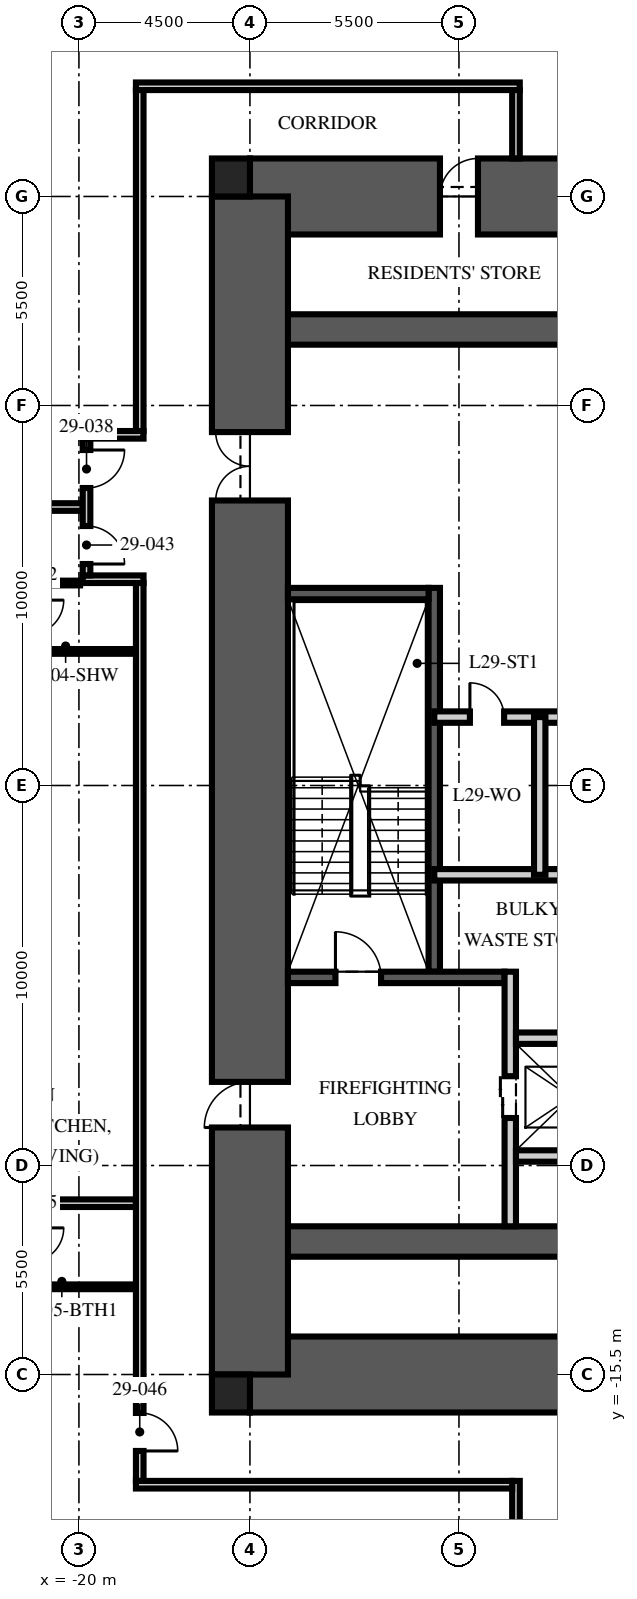
"""IFC4 building model, lengths in metres.
Left out: names, types, materials, properties, quantities, classifications, styles, units other than length and angle.
Written with IfcOpenShell. Run it as: python <this file> out.ifc"""

import sys

from ifc_helpers import new_model, si_unit, direction, frame, frame_2d, origin, origin_2d, place, context, subcontext, project, spatial, rectangle, extrude, element, fill, save


model = new_model("IFC4")
c1 = context("Model", 3, precision=1e-05, world=origin(), true_north=direction((0.0, 1.0)))
c2 = subcontext(c1, "Body", "Model", "MODEL_VIEW")
j1 = project(units=[si_unit("LENGTHUNIT", "METRE"), si_unit("PLANEANGLEUNIT", "RADIAN")], contexts=[c1])
p1 = place(None, origin())
s1 = spatial("IfcSite", under=j1, at=p1, CompositionType="ELEMENT")
p2 = place(p1, origin())
s2 = spatial("IfcBuilding", under=s1, at=p2, CompositionType="ELEMENT")
p3 = place(p2, frame((0.0, 0.0, 118.5)))
s3 = spatial("IfcBuildingStorey", under=s2, at=p3, CompositionType="ELEMENT", Elevation=118.5)
p4 = place(p3, frame((-15.5, 15.5, -0.25), z_axis=(0.0, 0.0, 1.0), x_axis=(1.0, 0.0, 0.0)))
e1 = element("IfcWall", 1, at=p4, inside=s3, PredefinedType="SHEAR", context=c2, shape_type="SweptSolid", body=[
    extrude(rectangle(XDim=31.0, YDim=2.0, at=frame_2d((15.5, 0.0))), origin(), (0.0, 0.0, 1.0), 3.75),
])
p5 = place(p4, frame((5.0, 0.0, 0.25)))
e2 = element("IfcOpeningElement", 2, at=p5, cuts=e1, PredefinedType="OPENING", context=c2, shape_type="SweptSolid", body=[
    extrude(rectangle(XDim=1.0, YDim=2.1, at=frame_2d((0.5, 1.05))), frame((0.0, 1.01, 0.0), z_axis=(0.0, -1.0, 0.0), x_axis=(1.0, 0.0, 0.0)), (0.0, 0.0, 1.0), 2.02),
])
p6 = place(p3, frame((-15.5, -15.5, -0.25), z_axis=(0.0, 0.0, 1.0), x_axis=(1.0, 0.0, 0.0)))
e3 = element("IfcWall", 3, at=p6, inside=s3, PredefinedType="SHEAR", context=c2, shape_type="SweptSolid", body=[
    extrude(rectangle(XDim=31.0, YDim=2.0, at=frame_2d((15.5, 0.0))), origin(), (0.0, 0.0, 1.0), 3.75),
])
p7 = place(p6, frame((10.4, 0.0, 0.25)))
e4 = element("IfcOpeningElement", 4, at=p7, cuts=e3, PredefinedType="OPENING", context=c2, shape_type="SweptSolid", body=[
    extrude(rectangle(XDim=1.1, YDim=2.1, at=frame_2d((0.55, 1.05))), frame((0.0, 1.01, 0.0), z_axis=(0.0, -1.0, 0.0), x_axis=(1.0, 0.0, 0.0)), (0.0, 0.0, 1.0), 2.02),
])
p8 = place(p6, frame((13.5, 0.0, 0.25)))
e5 = element("IfcOpeningElement", 5, at=p8, cuts=e3, PredefinedType="OPENING", context=c2, shape_type="SweptSolid", body=[
    extrude(rectangle(XDim=1.1, YDim=2.1, at=frame_2d((0.55, 1.05))), frame((0.0, 1.01, 0.0), z_axis=(0.0, -1.0, 0.0), x_axis=(1.0, 0.0, 0.0)), (0.0, 0.0, 1.0), 2.02),
])
p9 = place(p6, frame((16.6, 0.0, 0.25)))
e6 = element("IfcOpeningElement", 6, at=p9, cuts=e3, PredefinedType="OPENING", context=c2, shape_type="SweptSolid", body=[
    extrude(rectangle(XDim=1.1, YDim=2.1, at=frame_2d((0.55, 1.05))), frame((0.0, 1.01, 0.0), z_axis=(0.0, -1.0, 0.0), x_axis=(1.0, 0.0, 0.0)), (0.0, 0.0, 1.0), 2.02),
])
for number, where, z_axis, x_axis in (
    (7, (-15.5, 12.0, -0.25), (0.0, 0.0, 1.0), (1.0, 0.0, 0.0)),
    (8, (-15.5, -12.0, -0.25), (0.0, 0.0, 1.0), (1.0, 0.0, 0.0)),
):
    element("IfcWall", number, at=place(p3, frame(where, z_axis=z_axis, x_axis=x_axis)), inside=s3, PredefinedType="SHEAR", context=c2, shape_type="SweptSolid", body=[
        extrude(rectangle(XDim=31.0, YDim=0.8, at=frame_2d((15.5, 0.0))), origin(), (0.0, 0.0, 1.0), 3.75),
    ])
p10 = place(p3, frame((-15.5, -15.5, -0.25), z_axis=(0.0, 0.0, 1.0), x_axis=(0.0, 1.0, 0.0)))
e9 = element("IfcWall", 9, at=p10, inside=s3, PredefinedType="SHEAR", context=c2, shape_type="SweptSolid", body=[
    extrude(rectangle(XDim=31.0, YDim=2.0, at=frame_2d((15.5, 0.0))), origin(), (0.0, 0.0, 1.0), 3.75),
])
p11 = place(p10, frame((6.5, 0.0, 0.25)))
e10 = element("IfcOpeningElement", 10, at=p11, cuts=e9, PredefinedType="OPENING", context=c2, shape_type="SweptSolid", body=[
    extrude(rectangle(XDim=1.2, YDim=2.1, at=frame_2d((0.6, 1.05))), frame((0.0, 1.01, 0.0), z_axis=(0.0, -1.0, 0.0), x_axis=(1.0, 0.0, 0.0)), (0.0, 0.0, 1.0), 2.02),
])
p12 = place(p10, frame((23.0, 0.0, 0.25)))
e11 = element("IfcOpeningElement", 11, at=p12, cuts=e9, PredefinedType="OPENING", context=c2, shape_type="SweptSolid", body=[
    extrude(rectangle(XDim=1.8, YDim=2.1, at=frame_2d((0.9, 1.05))), frame((0.0, 1.01, 0.0), z_axis=(0.0, -1.0, 0.0), x_axis=(1.0, 0.0, 0.0)), (0.0, 0.0, 1.0), 2.02),
])
for number, where, z_axis, x_axis in (
    (12, (-16.0, 16.0, -0.25), (0.0, 0.0, 1.0), (1.0, 0.0, 0.0)),
    (13, (-16.0, -16.0, -0.25), (0.0, 0.0, 1.0), (1.0, 0.0, 0.0)),
):
    element("IfcColumn", number, at=place(p3, frame(where, z_axis=z_axis, x_axis=x_axis)), inside=s3, PredefinedType="COLUMN", context=c2, shape_type="SweptSolid", body=[
        extrude(rectangle(XDim=1.0, YDim=1.0, at=origin_2d()), origin(), (0.0, 0.0, 1.0), 3.75),
    ])
p13 = place(p3, frame((-10.65, -4.9, 0.0), z_axis=(0.0, 0.0, 1.0), x_axis=(0.0, 1.0, 0.0)))
e14 = element("IfcWall", 14, at=p13, inside=s3, PredefinedType="SOLIDWALL", context=c2, shape_type="SweptSolid", body=[
    extrude(rectangle(XDim=10.1, YDim=0.3, at=frame_2d((5.05, 0.0))), origin(), (0.0, 0.0, 1.0), 3.5),
])
p14 = place(p3, frame((-14.5, -5.05, 0.0), z_axis=(0.0, 0.0, 1.0), x_axis=(1.0, 0.0, 0.0)))
e15 = element("IfcWall", 15, at=p14, inside=s3, PredefinedType="SOLIDWALL", context=c2, shape_type="SweptSolid", body=[
    extrude(rectangle(XDim=5.7, YDim=0.3, at=frame_2d((2.85, 0.0))), origin(), (0.0, 0.0, 1.0), 3.5),
])
p15 = place(p14, frame((1.25, 0.0, 0.0)))
e16 = element("IfcOpeningElement", 16, at=p15, cuts=e15, PredefinedType="OPENING", context=c2, shape_type="SweptSolid", body=[
    extrude(rectangle(XDim=1.2, YDim=2.1, at=frame_2d((0.6, 1.05))), frame((0.0, 0.16, 0.0), z_axis=(0.0, -1.0, 0.0), x_axis=(1.0, 0.0, 0.0)), (0.0, 0.0, 1.0), 0.32),
])
p16 = place(p3, frame((-14.5, 5.05, 0.0), z_axis=(0.0, 0.0, 1.0), x_axis=(1.0, 0.0, 0.0)))
e17 = element("IfcWall", 17, at=p16, inside=s3, PredefinedType="SOLIDWALL", context=c2, shape_type="SweptSolid", body=[
    extrude(rectangle(XDim=3.7, YDim=0.3, at=frame_2d((1.85, 0.0))), origin(), (0.0, 0.0, 1.0), 3.5),
])
p17 = place(p3, frame((-8.65, -11.6, 0.0), z_axis=(0.0, 0.0, 1.0), x_axis=(0.0, 1.0, 0.0)))
e18 = element("IfcWall", 18, at=p17, inside=s3, PredefinedType="PARTITIONING", context=c2, shape_type="SweptSolid", body=[
    extrude(rectangle(XDim=6.7, YDim=0.3, at=frame_2d((3.35, 0.0))), origin(), (0.0, 0.0, 1.0), 3.5),
])
p18 = place(p17, frame((2.85, 0.0, 0.0)))
e19 = element("IfcOpeningElement", 19, at=p18, cuts=e18, PredefinedType="OPENING", context=c2, shape_type="SweptSolid", body=[
    extrude(rectangle(XDim=1.1, YDim=2.1, at=frame_2d((0.55, 1.05))), frame((0.0, 0.16, 0.0), z_axis=(0.0, -1.0, 0.0), x_axis=(1.0, 0.0, 0.0)), (0.0, 0.0, 1.0), 0.32),
])
p19 = place(p3, frame((-8.5, -6.65, 0.0), z_axis=(0.0, 0.0, 1.0), x_axis=(1.0, 0.0, 0.0)))
e20 = element("IfcWall", 20, at=p19, inside=s3, PredefinedType="PARTITIONING", context=c2, shape_type="SweptSolid", body=[
    extrude(rectangle(XDim=17.0, YDim=0.3, at=frame_2d((8.5, 0.0))), origin(), (0.0, 0.0, 1.0), 3.5),
])
p20 = place(p19, frame((7.8, 0.0, 0.0)))
e21 = element("IfcOpeningElement", 21, at=p20, cuts=e20, PredefinedType="OPENING", context=c2, shape_type="SweptSolid", body=[
    extrude(rectangle(XDim=1.3, YDim=2.4, at=frame_2d((0.65, 1.2))), frame((0.0, 0.16, 0.0), z_axis=(0.0, -1.0, 0.0), x_axis=(1.0, 0.0, 0.0)), (0.0, 0.0, 1.0), 0.32),
])
p21 = place(p19, frame((5.65, 0.0, 0.0)))
e22 = element("IfcOpeningElement", 22, at=p21, cuts=e20, PredefinedType="OPENING", context=c2, shape_type="SweptSolid", body=[
    extrude(rectangle(XDim=0.9, YDim=2.1, at=frame_2d((0.45, 1.05))), frame((0.0, 0.16, 0.0), z_axis=(0.0, -1.0, 0.0), x_axis=(1.0, 0.0, 0.0)), (0.0, 0.0, 1.0), 0.32),
])
p22 = place(p19, frame((10.4, 0.0, 0.0)))
e23 = element("IfcOpeningElement", 23, at=p22, cuts=e20, PredefinedType="OPENING", context=c2, shape_type="SweptSolid", body=[
    extrude(rectangle(XDim=0.9, YDim=2.1, at=frame_2d((0.45, 1.05))), frame((0.0, 0.16, 0.0), z_axis=(0.0, -1.0, 0.0), x_axis=(1.0, 0.0, 0.0)), (0.0, 0.0, 1.0), 0.32),
])
p23 = place(p3, frame((-8.5, -9.75, 0.0), z_axis=(0.0, 0.0, 1.0), x_axis=(1.0, 0.0, 0.0)))
e24 = element("IfcWall", 24, at=p23, inside=s3, PredefinedType="PARTITIONING", context=c2, shape_type="SweptSolid", body=[
    extrude(rectangle(XDim=2.9, YDim=0.3, at=frame_2d((1.45, 0.0))), origin(), (0.0, 0.0, 1.0), 3.5),
])
p24 = place(p3, frame((-10.65, 1.8, 0.0), z_axis=(0.0, 0.0, 1.0), x_axis=(1.0, 0.0, 0.0)))
e25 = element("IfcWall", 25, at=p24, inside=s3, PredefinedType="PARTITIONING", context=c2, shape_type="SweptSolid", body=[
    extrude(rectangle(XDim=21.3, YDim=0.3, at=frame_2d((10.65, 0.0))), origin(), (0.0, 0.0, 1.0), 3.5),
])
p25 = place(p24, frame((10.05, 0.0, 0.0)))
e26 = element("IfcOpeningElement", 26, at=p25, cuts=e25, PredefinedType="OPENING", context=c2, shape_type="SweptSolid", body=[
    extrude(rectangle(XDim=1.2, YDim=2.1, at=frame_2d((0.6, 1.05))), frame((0.0, 0.16, 0.0), z_axis=(0.0, -1.0, 0.0), x_axis=(1.0, 0.0, 0.0)), (0.0, 0.0, 1.0), 0.32),
])
p26 = place(p24, frame((0.938, 0.0, 0.0)))
e27 = element("IfcOpeningElement", 27, at=p26, cuts=e25, PredefinedType="OPENING", context=c2, shape_type="SweptSolid", body=[
    extrude(rectangle(XDim=0.9, YDim=2.1, at=frame_2d((0.45, 1.05))), frame((0.0, 0.16, 0.0), z_axis=(0.0, -1.0, 0.0), x_axis=(1.0, 0.0, 0.0)), (0.0, 0.0, 1.0), 0.32),
])
p27 = place(p3, frame((-10.65, -2.35, 0.0), z_axis=(0.0, 0.0, 1.0), x_axis=(1.0, 0.0, 0.0)))
e28 = element("IfcWall", 28, at=p27, inside=s3, PredefinedType="PARTITIONING", context=c2, shape_type="SweptSolid", body=[
    extrude(rectangle(XDim=5.55, YDim=0.3, at=frame_2d((2.775, 0.0))), origin(), (0.0, 0.0, 1.0), 3.5),
])
p28 = place(p3, frame((-7.875, -2.35, 0.0), z_axis=(0.0, 0.0, 1.0), x_axis=(0.0, 1.0, 0.0)))
e29 = element("IfcWall", 29, at=p28, inside=s3, PredefinedType="PARTITIONING", context=c2, shape_type="SweptSolid", body=[
    extrude(rectangle(XDim=4.15, YDim=0.3, at=frame_2d((2.075, 0.0))), origin(), (0.0, 0.0, 1.0), 3.5),
])
p29 = place(p3, frame((-18.5, 18.4, 0.0), z_axis=(0.0, 0.0, 1.0), x_axis=(1.0, 0.0, 0.0)))
e30 = element("IfcWall", 30, at=p29, inside=s3, PredefinedType="PARTITIONING", context=c2, shape_type="SweptSolid", body=[
    extrude(rectangle(XDim=10.1, YDim=0.2, at=frame_2d((5.05, 0.0))), origin(), (0.0, 0.0, 1.0), 2.3),
])
p30 = place(p3, frame((-8.5, 18.3, 0.0), z_axis=(0.0, 0.0, 1.0), x_axis=(0.0, -1.0, 0.0)))
e31 = element("IfcWall", 31, at=p30, inside=s3, PredefinedType="PARTITIONING", context=c2, shape_type="SweptSolid", body=[
    extrude(rectangle(XDim=1.8, YDim=0.2, at=frame_2d((0.9, 0.0))), origin(), (0.0, 0.0, 1.0), 3.5),
])
p31 = place(p3, frame((-19.9, 7.328, 0.0), z_axis=(0.0, 0.0, 1.0), x_axis=(-1.0, 0.0, 0.0)))
e32 = element("IfcWall", 32, at=p31, inside=s3, PredefinedType="PARTITIONING", context=c2, shape_type="SweptSolid", body=[
    extrude(rectangle(XDim=9.25, YDim=0.2, at=frame_2d((4.625, 0.0))), origin(), (0.0, 0.0, 1.0), 2.81),
])
p32 = place(p3, frame((-18.5, -10.992, 0.0), z_axis=(0.0, 0.0, 1.0), x_axis=(-1.0, 0.0, 0.0)))
e33 = element("IfcWall", 33, at=p32, inside=s3, PredefinedType="PARTITIONING", context=c2, shape_type="SweptSolid", body=[
    extrude(rectangle(XDim=10.65, YDim=0.2, at=frame_2d((5.325, 0.0))), origin(), (0.0, 0.0, 1.0), 2.81),
])
p33 = place(p3, frame((-19.97, 5.328, 0.0), z_axis=(0.0, 0.0, 1.0), x_axis=(-1.0, 0.0, 0.0)))
e34 = element("IfcWall", 34, at=p33, inside=s3, PredefinedType="PARTITIONING", context=c2, shape_type="SweptSolid", body=[
    extrude(rectangle(XDim=1.33, YDim=0.125, at=frame_2d((0.665, 0.0))), origin(), (0.0, 0.0, 1.0), 3.5),
])
for number, where, z_axis, x_axis in (
    (35, (-18.5, 3.528, 0.0), (0.0, 0.0, 1.0), (-1.0, 0.0, 0.0)),
    (36, (-18.5, -13.192, 0.0), (0.0, 0.0, 1.0), (-1.0, 0.0, 0.0)),
):
    element("IfcWall", number, at=place(p3, frame(where, z_axis=z_axis, x_axis=x_axis)), inside=s3, PredefinedType="PARTITIONING", context=c2, shape_type="SweptSolid", body=[
        extrude(rectangle(XDim=2.8, YDim=0.125, at=frame_2d((1.4, 0.0))), origin(), (0.0, 0.0, 1.0), 3.5),
    ])
p34 = place(p3, frame((-18.4, 18.3, 0.0), z_axis=(0.0, 0.0, 1.0), x_axis=(0.0, -1.0, 0.0)))
e37 = element("IfcWall", 37, at=p34, inside=s3, PredefinedType="PARTITIONING", context=c2, shape_type="SweptSolid", body=[
    extrude(rectangle(XDim=8.972, YDim=0.2, at=frame_2d((4.486, 0.0))), origin(), (0.0, 0.0, 1.0), 2.3),
])
p35 = place(p3, frame((-18.3, 9.228, 0.0), z_axis=(0.0, 0.0, 1.0), x_axis=(-1.0, 0.0, 0.0)))
e38 = element("IfcWall", 38, at=p35, inside=s3, PredefinedType="PARTITIONING", context=c2, shape_type="SweptSolid", body=[
    extrude(rectangle(XDim=1.6, YDim=0.2, at=frame_2d((0.8, 0.0))), origin(), (0.0, 0.0, 1.0), 2.7),
])
p36 = place(p3, frame((-18.3, 5.428, 0.0), z_axis=(0.0, 0.0, 1.0), x_axis=(-1.0, 0.0, 0.0)))
e39 = element("IfcWall", 39, at=p36, inside=s3, PredefinedType="PARTITIONING", context=c2, shape_type="SweptSolid", body=[
    extrude(rectangle(XDim=1.6, YDim=0.2, at=frame_2d((0.8, 0.0))), origin(), (0.0, 0.0, 1.0), 3.5),
])
p37 = place(p3, frame((-19.8, 9.128, 0.0), z_axis=(0.0, 0.0, 1.0), x_axis=(0.0, -1.0, 0.0)))
e40 = element("IfcWall", 40, at=p37, inside=s3, PredefinedType="PARTITIONING", context=c2, shape_type="SweptSolid", body=[
    extrude(rectangle(XDim=3.6, YDim=0.2, at=frame_2d((1.8, 0.0))), origin(), (0.0, 0.0, 1.0), 2.7),
])
p38 = place(p37, frame((0.3, 0.0, 0.0)))
e41 = element("IfcOpeningElement", 41, at=p38, cuts=e40, PredefinedType="OPENING", context=c2, shape_type="SweptSolid", body=[
    extrude(rectangle(XDim=1.0, YDim=2.2, at=frame_2d((0.5, 1.1))), frame((0.0, 0.11, 0.0), z_axis=(0.0, -1.0, 0.0), x_axis=(1.0, 0.0, 0.0)), (0.0, 0.0, 1.0), 0.22),
])
p39 = place(p37, frame((2.3, 0.0, 0.0)))
e42 = element("IfcOpeningElement", 42, at=p39, cuts=e40, PredefinedType="OPENING", context=c2, shape_type="SweptSolid", body=[
    extrude(rectangle(XDim=1.0, YDim=2.2, at=frame_2d((0.5, 1.1))), frame((0.0, 0.11, 0.0), z_axis=(0.0, -1.0, 0.0), x_axis=(1.0, 0.0, 0.0)), (0.0, 0.0, 1.0), 0.22),
])
p40 = place(p3, frame((-18.4, 5.328, 0.0), z_axis=(0.0, 0.0, 1.0), x_axis=(0.0, -1.0, 0.0)))
e43 = element("IfcWall", 43, at=p40, inside=s3, PredefinedType="PARTITIONING", context=c2, shape_type="SweptSolid", body=[
    extrude(rectangle(XDim=23.628, YDim=0.2, at=frame_2d((11.814, 0.0))), origin(), (0.0, 0.0, 1.0), 2.3),
])
p41 = place(p40, frame((21.84, 0.0, 0.0)))
e44 = element("IfcOpeningElement", 44, at=p41, cuts=e43, PredefinedType="OPENING", context=c2, shape_type="SweptSolid", body=[
    extrude(rectangle(XDim=1.0, YDim=2.2, at=frame_2d((0.5, 1.1))), frame((0.0, 0.11, 0.0), z_axis=(0.0, -1.0, 0.0), x_axis=(1.0, 0.0, 0.0)), (0.0, 0.0, 1.0), 0.22),
])
p42 = place(p3, frame((-8.5, -18.3, 0.0), z_axis=(0.0, 0.0, 1.0), x_axis=(0.0, -1.0, 0.0)))
e45 = element("IfcWall", 45, at=p42, inside=s3, PredefinedType="PARTITIONING", context=c2, shape_type="SweptSolid", body=[
    extrude(rectangle(XDim=3.0, YDim=0.2, at=frame_2d((1.5, 0.0))), origin(), (0.0, 0.0, 1.0), 3.5),
])
p43 = place(p3, frame((-8.6, -18.4, 0.0), z_axis=(0.0, 0.0, 1.0), x_axis=(-1.0, 0.0, 0.0)))
e46 = element("IfcWall", 46, at=p43, inside=s3, PredefinedType="PARTITIONING", context=c2, shape_type="SweptSolid", body=[
    extrude(rectangle(XDim=9.9, YDim=0.2, at=frame_2d((4.95, 0.0))), origin(), (0.0, 0.0, 1.0), 2.3),
])
p44 = place(p15, origin())
e47 = element("IfcDoor", 47, at=p44, inside=s3, OperationType="SINGLE_SWING_LEFT", PredefinedType="DOOR", context=c2, shape_type="SweptSolid", body=[
    extrude(rectangle(XDim=1.2, YDim=2.1, at=frame_2d((0.6, 1.05))), frame((0.0, 0.025, 0.0), z_axis=(0.0, -1.0, 0.0), x_axis=(1.0, 0.0, 0.0)), (0.0, 0.0, 1.0), 0.05),
])
fill(e16, e47)
p45 = place(p11, origin())
e48 = element("IfcDoor", 48, at=p45, inside=s3, OperationType="SINGLE_SWING_LEFT", PredefinedType="DOOR", context=c2, shape_type="SweptSolid", body=[
    extrude(rectangle(XDim=1.2, YDim=2.1, at=frame_2d((0.6, 1.05))), frame((0.0, 0.025, 0.0), z_axis=(0.0, -1.0, 0.0), x_axis=(1.0, 0.0, 0.0)), (0.0, 0.0, 1.0), 0.05),
])
fill(e10, e48)
p46 = place(p12, origin())
e49 = element("IfcDoor", 49, at=p46, inside=s3, OperationType="DOUBLE_DOOR_SINGLE_SWING", PredefinedType="DOOR", context=c2, shape_type="SweptSolid", body=[
    extrude(rectangle(XDim=1.8, YDim=2.1, at=frame_2d((0.9, 1.05))), frame((0.0, 0.025, 0.0), z_axis=(0.0, -1.0, 0.0), x_axis=(1.0, 0.0, 0.0)), (0.0, 0.0, 1.0), 0.05),
])
fill(e11, e49)
p47 = place(p18, origin())
e50 = element("IfcDoor", 50, at=p47, inside=s3, OperationType="DOUBLE_DOOR_SLIDING", PredefinedType="DOOR", context=c2, shape_type="SweptSolid", body=[
    extrude(rectangle(XDim=1.1, YDim=2.1, at=frame_2d((0.55, 1.05))), frame((0.0, 0.025, 0.0), z_axis=(0.0, -1.0, 0.0), x_axis=(1.0, 0.0, 0.0)), (0.0, 0.0, 1.0), 0.05),
])
fill(e19, e50)
p48 = place(p26, origin())
e51 = element("IfcDoor", 51, at=p48, inside=s3, OperationType="SINGLE_SWING_LEFT", PredefinedType="DOOR", context=c2, shape_type="SweptSolid", body=[
    extrude(rectangle(XDim=0.9, YDim=2.1, at=frame_2d((0.45, 1.05))), frame((0.0, 0.025, 0.0), z_axis=(0.0, -1.0, 0.0), x_axis=(1.0, 0.0, 0.0)), (0.0, 0.0, 1.0), 0.05),
])
fill(e27, e51)
p49 = place(p5, origin())
e52 = element("IfcDoor", 52, at=p49, inside=s3, OperationType="SINGLE_SWING_RIGHT", PredefinedType="DOOR", context=c2, shape_type="SweptSolid", body=[
    extrude(rectangle(XDim=1.0, YDim=2.1, at=frame_2d((0.5, 1.05))), frame((0.0, 0.025, 0.0), z_axis=(0.0, -1.0, 0.0), x_axis=(1.0, 0.0, 0.0)), (0.0, 0.0, 1.0), 0.05),
])
fill(e2, e52)
p50 = place(p38, origin())
e53 = element("IfcDoor", 53, at=p50, inside=s3, OperationType="SINGLE_SWING_LEFT", PredefinedType="DOOR", context=c2, shape_type="SweptSolid", body=[
    extrude(rectangle(XDim=1.0, YDim=2.2, at=frame_2d((0.5, 1.1))), frame((0.0, 0.025, 0.0), z_axis=(0.0, -1.0, 0.0), x_axis=(1.0, 0.0, 0.0)), (0.0, 0.0, 1.0), 0.05),
])
fill(e41, e53)
p51 = place(p39, origin())
e54 = element("IfcDoor", 54, at=p51, inside=s3, OperationType="SINGLE_SWING_RIGHT", PredefinedType="DOOR", context=c2, shape_type="SweptSolid", body=[
    extrude(rectangle(XDim=1.0, YDim=2.2, at=frame_2d((0.5, 1.1))), frame((0.0, 0.025, 0.0), z_axis=(0.0, -1.0, 0.0), x_axis=(1.0, 0.0, 0.0)), (0.0, 0.0, 1.0), 0.05),
])
fill(e42, e54)
p52 = place(p41, origin())
e55 = element("IfcDoor", 55, at=p52, inside=s3, OperationType="SINGLE_SWING_RIGHT", PredefinedType="DOOR", context=c2, shape_type="SweptSolid", body=[
    extrude(rectangle(XDim=1.0, YDim=2.2, at=frame_2d((0.5, 1.1))), frame((0.0, 0.025, 0.0), z_axis=(0.0, -1.0, 0.0), x_axis=(1.0, 0.0, 0.0)), (0.0, 0.0, 1.0), 0.05),
])
fill(e44, e55)
save(model, sys.argv[1])
